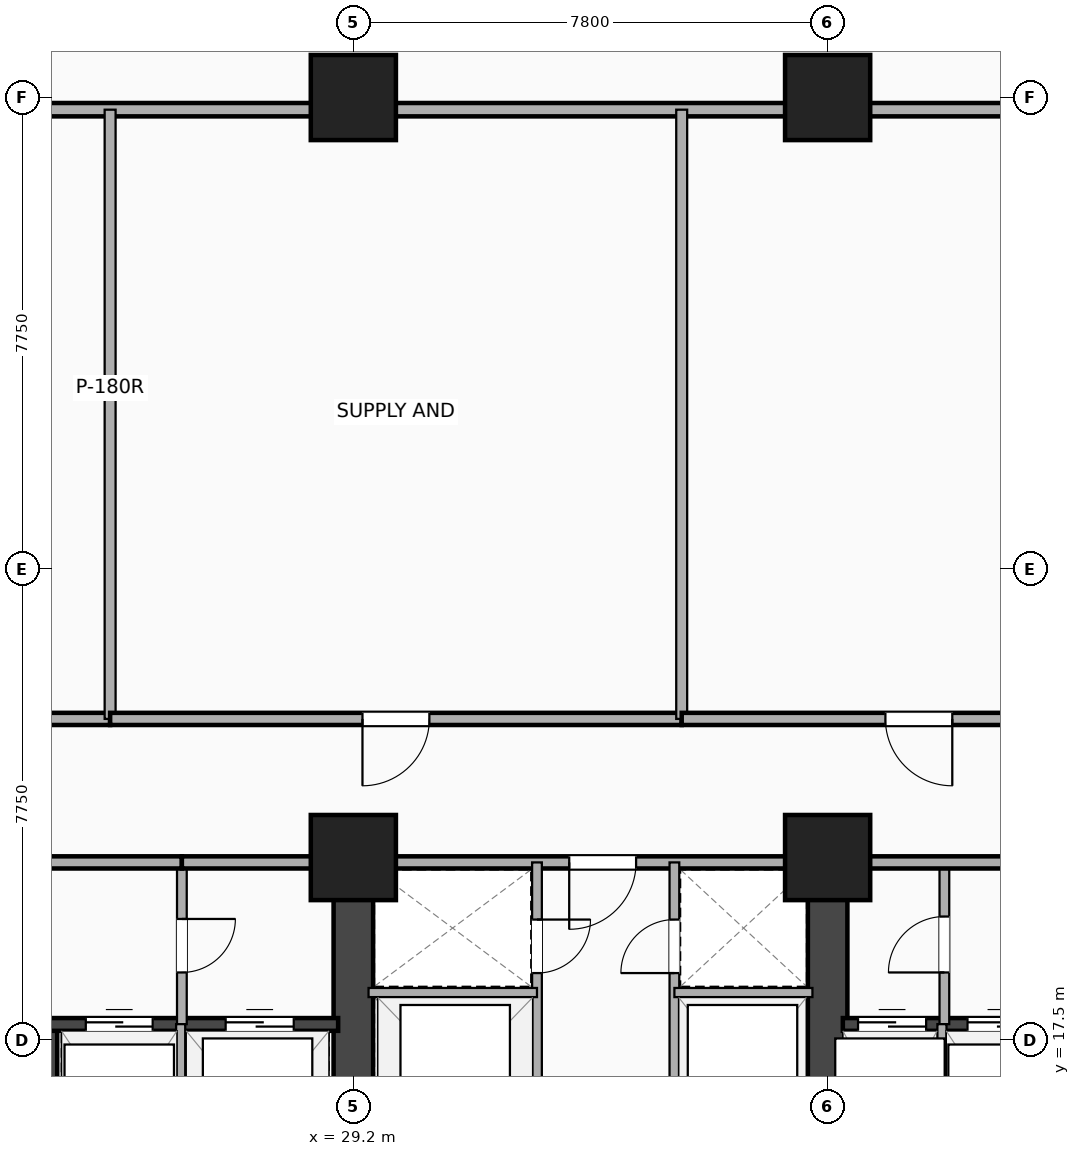
"""IFC4 building model, lengths in metres.
Left out: names, types, materials, properties, quantities, classifications, styles, units other than length and angle.
Written with IfcOpenShell. Run it as: python <this file> out.ifc"""

import sys

from ifc_helpers import new_model, si_unit, direction, frame, frame_2d, origin, origin_2d, place, context, subcontext, project, spatial, rectangle, extrude, element, fill, save


model = new_model("IFC4")
c1 = context("Model", 3, precision=1e-05, world=origin(), true_north=direction((0.0, 1.0)))
c2 = subcontext(c1, "Body", "Model", "MODEL_VIEW")
j1 = project(units=[si_unit("LENGTHUNIT", "METRE"), si_unit("PLANEANGLEUNIT", "RADIAN")], contexts=[c1])
p1 = place(None, origin())
s1 = spatial("IfcSite", under=j1, at=p1, CompositionType="ELEMENT")
p2 = place(p1, origin())
s2 = spatial("IfcBuilding", under=s1, at=p2, CompositionType="ELEMENT")
p3 = place(p2, frame((0.0, 0.0, 75.4)))
s3 = spatial("IfcBuildingStorey", under=s2, at=p3, CompositionType="ELEMENT", Elevation=75.4)
p4 = place(p3, frame((29.2, 3.5, 0.0), z_axis=(0.0, 0.0, 1.0), x_axis=(0.0, 1.0, 0.0)))
e1 = element("IfcWall", 1, at=p4, inside=s3, PredefinedType="SHEAR", context=c2, shape_type="SweptSolid", body=[
    extrude(rectangle(XDim=16.9, YDim=0.65, at=frame_2d((8.45, 0.0))), origin(), (0.0, 0.0, 1.0), 8.14),
])
p5 = place(p4, frame((7.75, 0.0, 0.0), z_axis=(0.0, 0.0, 1.0), x_axis=(-1.0, 0.0, 0.0)))
e2 = element("IfcOpeningElement", 2, at=p5, cuts=e1, PredefinedType="OPENING", context=c2, shape_type="SweptSolid", body=[
    extrude(rectangle(XDim=1.1, YDim=2.15, at=frame_2d((0.55, 1.075))), frame((0.0, 0.335, 0.0), z_axis=(0.0, -1.0, 0.0), x_axis=(1.0, 0.0, 0.0)), (0.0, 0.0, 1.0), 0.67),
])
p6 = place(p3, frame((37.0, 3.5, 0.0), z_axis=(0.0, 0.0, 1.0), x_axis=(0.0, 1.0, 0.0)))
e3 = element("IfcWall", 3, at=p6, inside=s3, PredefinedType="SHEAR", context=c2, shape_type="SweptSolid", body=[
    extrude(rectangle(XDim=16.9, YDim=0.65, at=frame_2d((8.45, 0.0))), origin(), (0.0, 0.0, 1.0), 8.14),
])
p7 = place(p6, frame((6.65, 0.0, 0.0)))
e4 = element("IfcOpeningElement", 4, at=p7, cuts=e3, PredefinedType="OPENING", context=c2, shape_type="SweptSolid", body=[
    extrude(rectangle(XDim=1.1, YDim=2.15, at=frame_2d((0.55, 1.075))), frame((0.0, 0.335, 0.0), z_axis=(0.0, -1.0, 0.0), x_axis=(1.0, 0.0, 0.0)), (0.0, 0.0, 1.0), 0.67),
])
p8 = place(p3, frame((24.225, 9.745, 0.0), z_axis=(0.0, 0.0, 1.0), x_axis=(0.0, 1.0, 0.0)))
e5 = element("IfcWall", 5, at=p8, inside=s3, PredefinedType="SHEAR", context=c2, shape_type="SweptSolid", body=[
    extrude(rectangle(XDim=8.01, YDim=0.21, at=frame_2d((4.005, 0.0))), origin(), (0.0, 0.0, 1.0), 8.14),
])
p9 = place(p3, frame((20.65, 17.755, 0.0), z_axis=(0.0, 0.0, 1.0), x_axis=(1.0, 0.0, 0.0)))
e6 = element("IfcWall", 6, at=p9, inside=s3, PredefinedType="SHEAR", context=c2, shape_type="SweptSolid", body=[
    extrude(rectangle(XDim=8.3, YDim=0.21, at=frame_2d((4.15, 0.0))), origin(), (0.0, 0.0, 1.0), 8.14),
])
p10 = place(p9, frame((2.2, 0.0, 0.0), z_axis=(0.0, 0.0, 1.0), x_axis=(-1.0, 0.0, 0.0)))
e7 = element("IfcOpeningElement", 7, at=p10, cuts=e6, PredefinedType="OPENING", context=c2, shape_type="SweptSolid", body=[
    extrude(rectangle(XDim=1.05, YDim=2.15, at=frame_2d((0.525, 1.075))), frame((0.0, 0.115, 0.0), z_axis=(0.0, -1.0, 0.0), x_axis=(1.0, 0.0, 0.0)), (0.0, 0.0, 1.0), 0.23),
])
p11 = place(p9, frame((4.15, 0.0, 0.0)))
e8 = element("IfcOpeningElement", 8, at=p11, cuts=e6, PredefinedType="OPENING", context=c2, shape_type="SweptSolid", body=[
    extrude(rectangle(XDim=1.1, YDim=2.18, at=frame_2d((0.55, 1.09))), frame((0.0, 0.115, 0.0), z_axis=(0.0, -1.0, 0.0), x_axis=(1.0, 0.0, 0.0)), (0.0, 0.0, 1.0), 0.23),
])
p12 = place(p9, frame((6.45, 0.0, 0.0)))
e9 = element("IfcOpeningElement", 9, at=p12, cuts=e6, PredefinedType="OPENING", context=c2, shape_type="SweptSolid", body=[
    extrude(rectangle(XDim=1.12, YDim=2.2, at=frame_2d((0.56, 1.1))), frame((0.0, 0.115, 0.0), z_axis=(0.0, -1.0, 0.0), x_axis=(1.0, 0.0, 0.0)), (0.0, 0.0, 1.0), 0.23),
])
p13 = place(p3, frame((37.25, 17.755, 0.0), z_axis=(0.0, 0.0, 1.0), x_axis=(1.0, 0.0, 0.0)))
e10 = element("IfcWall", 10, at=p13, inside=s3, PredefinedType="SHEAR", context=c2, shape_type="SweptSolid", body=[
    extrude(rectangle(XDim=7.2, YDim=0.21, at=frame_2d((3.6, 0.0))), origin(), (0.0, 0.0, 1.0), 8.14),
])
p14 = place(p13, frame((0.25, 0.0, 0.0)))
e11 = element("IfcOpeningElement", 11, at=p14, cuts=e10, PredefinedType="OPENING", context=c2, shape_type="SweptSolid", body=[
    extrude(rectangle(XDim=1.12, YDim=2.2, at=frame_2d((0.56, 1.1))), frame((0.0, 0.115, 0.0), z_axis=(0.0, -1.0, 0.0), x_axis=(1.0, 0.0, 0.0)), (0.0, 0.0, 1.0), 0.23),
])
p15 = place(p13, frame((2.05, 0.0, 0.0)))
e12 = element("IfcOpeningElement", 12, at=p15, cuts=e10, PredefinedType="OPENING", context=c2, shape_type="SweptSolid", body=[
    extrude(rectangle(XDim=1.1, YDim=2.18, at=frame_2d((0.55, 1.09))), frame((0.0, 0.115, 0.0), z_axis=(0.0, -1.0, 0.0), x_axis=(1.0, 0.0, 0.0)), (0.0, 0.0, 1.0), 0.23),
])
p16 = place(p13, frame((5.78, 0.0, 0.0), z_axis=(0.0, 0.0, 1.0), x_axis=(-1.0, 0.0, 0.0)))
e13 = element("IfcOpeningElement", 13, at=p16, cuts=e10, PredefinedType="OPENING", context=c2, shape_type="SweptSolid", body=[
    extrude(rectangle(XDim=1.05, YDim=2.15, at=frame_2d((0.525, 1.075))), frame((0.0, 0.115, 0.0), z_axis=(0.0, -1.0, 0.0), x_axis=(1.0, 0.0, 0.0)), (0.0, 0.0, 1.0), 0.23),
])
for number, where, z_axis, x_axis in (
    (14, (29.2, 20.5, -0.32), (0.0, 0.0, 1.0), (1.0, 0.0, 0.0)),
    (15, (37.0, 20.5, -0.32), (0.0, 0.0, 1.0), (1.0, 0.0, 0.0)),
    (16, (29.2, 33.0, -0.32), (0.0, 0.0, 1.0), (1.0, 0.0, 0.0)),
    (17, (37.0, 33.0, -0.32), (0.0, 0.0, 1.0), (1.0, 0.0, 0.0)),
):
    element("IfcColumn", number, at=place(p3, frame(where, z_axis=z_axis, x_axis=x_axis)), inside=s3, PredefinedType="COLUMN", context=c2, shape_type="SweptSolid", body=[
        extrude(rectangle(XDim=1.4, YDim=1.4, at=origin_2d()), origin(), (0.0, 0.0, 1.0), 8.46),
    ])
p17 = place(p3, frame((26.38, 17.76, 0.0), z_axis=(0.0, 0.0, 1.0), x_axis=(0.0, 1.0, 0.0)))
e18 = element("IfcWall", 18, at=p17, inside=s3, PredefinedType="PARTITIONING", context=c2, shape_type="SweptSolid", body=[
    extrude(rectangle(XDim=2.66, YDim=0.16, at=frame_2d((1.33, 0.0))), origin(), (0.0, 0.0, 1.0), 7.43),
])
p18 = place(p17, frame((0.85, 0.0, 0.0)))
e19 = element("IfcOpeningElement", 19, at=p18, cuts=e18, PredefinedType="OPENING", context=c2, shape_type="SweptSolid", body=[
    extrude(rectangle(XDim=0.88, YDim=2.08, at=frame_2d((0.44, 1.04))), frame((0.0, 0.09, 0.0), z_axis=(0.0, -1.0, 0.0), x_axis=(1.0, 0.0, 0.0)), (0.0, 0.0, 1.0), 0.18),
])
p19 = place(p3, frame((38.92, 17.76, 0.0), z_axis=(0.0, 0.0, 1.0), x_axis=(0.0, 1.0, 0.0)))
e20 = element("IfcWall", 20, at=p19, inside=s3, PredefinedType="PARTITIONING", context=c2, shape_type="SweptSolid", body=[
    extrude(rectangle(XDim=2.66, YDim=0.16, at=frame_2d((1.33, 0.0))), origin(), (0.0, 0.0, 1.0), 7.43),
])
p20 = place(p19, frame((1.77, 0.0, 0.0), z_axis=(0.0, 0.0, 1.0), x_axis=(-1.0, 0.0, 0.0)))
e21 = element("IfcOpeningElement", 21, at=p20, cuts=e20, PredefinedType="OPENING", context=c2, shape_type="SweptSolid", body=[
    extrude(rectangle(XDim=0.92, YDim=2.08, at=frame_2d((0.46, 1.04))), frame((0.0, 0.09, 0.0), z_axis=(0.0, -1.0, 0.0), x_axis=(1.0, 0.0, 0.0)), (0.0, 0.0, 1.0), 0.18),
])
for number, where, z_axis, x_axis in (
    (22, (26.36, 14.72, 0.0), (0.0, 0.0, 1.0), (0.0, 1.0, 0.0)),
    (23, (38.88, 14.72, 0.0), (0.0, 0.0, 1.0), (0.0, 1.0, 0.0)),
):
    element("IfcWall", number, at=place(p3, frame(where, z_axis=z_axis, x_axis=x_axis)), inside=s3, PredefinedType="PARTITIONING", context=c2, shape_type="SweptSolid", body=[
        extrude(rectangle(XDim=3.04, YDim=0.15, at=frame_2d((1.52, 0.0))), origin(), (0.0, 0.0, 1.0), 8.14),
    ])
p21 = place(p3, frame((20.65, 20.42, 0.0), z_axis=(0.0, 0.0, 1.0), x_axis=(1.0, 0.0, 0.0)))
e24 = element("IfcWall", 24, at=p21, inside=s3, PredefinedType="PARTITIONING", context=c2, shape_type="SweptSolid", body=[
    extrude(rectangle(XDim=5.73, YDim=0.2, at=frame_2d((2.865, 0.0))), origin(), (0.0, 0.0, 1.0), 7.43),
])
p22 = place(p21, frame((2.3, 0.0, 0.0)))
e25 = element("IfcOpeningElement", 25, at=p22, cuts=e24, PredefinedType="OPENING", context=c2, shape_type="SweptSolid", body=[
    extrude(rectangle(XDim=1.1, YDim=2.15, at=frame_2d((0.55, 1.075))), frame((0.0, 0.11, 0.0), z_axis=(0.0, -1.0, 0.0), x_axis=(1.0, 0.0, 0.0)), (0.0, 0.0, 1.0), 0.22),
])
p23 = place(p3, frame((26.38, 20.42, 0.0), z_axis=(0.0, 0.0, 1.0), x_axis=(1.0, 0.0, 0.0)))
e26 = element("IfcWall", 26, at=p23, inside=s3, PredefinedType="PARTITIONING", context=c2, shape_type="SweptSolid", body=[
    extrude(rectangle(XDim=2.82, YDim=0.2, at=frame_2d((1.41, 0.0))), origin(), (0.0, 0.0, 1.0), 7.43),
])
p24 = place(p3, frame((29.2, 20.42, 0.0), z_axis=(0.0, 0.0, 1.0), x_axis=(1.0, 0.0, 0.0)))
e27 = element("IfcWall", 27, at=p24, inside=s3, PredefinedType="PARTITIONING", context=c2, shape_type="SweptSolid", body=[
    extrude(rectangle(XDim=7.8, YDim=0.2, at=frame_2d((3.9, 0.0))), origin(), (0.0, 0.0, 1.0), 7.43),
])
p25 = place(p24, frame((3.55, 0.0, 0.0)))
e28 = element("IfcOpeningElement", 28, at=p25, cuts=e27, PredefinedType="OPENING", context=c2, shape_type="SweptSolid", body=[
    extrude(rectangle(XDim=1.1, YDim=2.15, at=frame_2d((0.55, 1.075))), frame((0.0, 0.11, 0.0), z_axis=(0.0, -1.0, 0.0), x_axis=(1.0, 0.0, 0.0)), (0.0, 0.0, 1.0), 0.22),
])
p26 = place(p3, frame((37.0, 20.42, 0.0), z_axis=(0.0, 0.0, 1.0), x_axis=(1.0, 0.0, 0.0)))
e29 = element("IfcWall", 29, at=p26, inside=s3, PredefinedType="PARTITIONING", context=c2, shape_type="SweptSolid", body=[
    extrude(rectangle(XDim=7.45, YDim=0.2, at=frame_2d((3.725, 0.0))), origin(), (0.0, 0.0, 1.0), 6.445),
])
p27 = place(p26, frame((4.2, 0.0, 0.0)))
e30 = element("IfcOpeningElement", 30, at=p27, cuts=e29, PredefinedType="OPENING", context=c2, shape_type="SweptSolid", body=[
    extrude(rectangle(XDim=1.1, YDim=2.15, at=frame_2d((0.55, 1.075))), frame((0.0, 0.11, 0.0), z_axis=(0.0, -1.0, 0.0), x_axis=(1.0, 0.0, 0.0)), (0.0, 0.0, 1.0), 0.22),
])
p28 = place(p3, frame((32.22, 12.5, 0.0), z_axis=(0.0, 0.0, 1.0), x_axis=(0.0, 1.0, 0.0)))
e31 = element("IfcWall", 31, at=p28, inside=s3, PredefinedType="PARTITIONING", context=c2, shape_type="SweptSolid", body=[
    extrude(rectangle(XDim=7.92, YDim=0.16, at=frame_2d((3.96, 0.0))), origin(), (0.0, 0.0, 1.0), 7.43),
])
p29 = place(p28, frame((6.1, 0.0, 0.0)))
e32 = element("IfcOpeningElement", 32, at=p29, cuts=e31, PredefinedType="OPENING", context=c2, shape_type="SweptSolid", body=[
    extrude(rectangle(XDim=0.88, YDim=2.08, at=frame_2d((0.44, 1.04))), frame((0.0, 0.09, 0.0), z_axis=(0.0, -1.0, 0.0), x_axis=(1.0, 0.0, 0.0)), (0.0, 0.0, 1.0), 0.18),
])
p30 = place(p3, frame((34.48, 12.5, 0.0), z_axis=(0.0, 0.0, 1.0), x_axis=(0.0, 1.0, 0.0)))
e33 = element("IfcWall", 33, at=p30, inside=s3, PredefinedType="PARTITIONING", context=c2, shape_type="SweptSolid", body=[
    extrude(rectangle(XDim=7.92, YDim=0.16, at=frame_2d((3.96, 0.0))), origin(), (0.0, 0.0, 1.0), 7.43),
])
p31 = place(p30, frame((6.98, 0.0, 0.0), z_axis=(0.0, 0.0, 1.0), x_axis=(-1.0, 0.0, 0.0)))
e34 = element("IfcOpeningElement", 34, at=p31, cuts=e33, PredefinedType="OPENING", context=c2, shape_type="SweptSolid", body=[
    extrude(rectangle(XDim=0.88, YDim=2.08, at=frame_2d((0.44, 1.04))), frame((0.0, 0.09, 0.0), z_axis=(0.0, -1.0, 0.0), x_axis=(1.0, 0.0, 0.0)), (0.0, 0.0, 1.0), 0.18),
])
p32 = place(p3, frame((29.45, 18.28, 0.0), z_axis=(0.0, 0.0, 1.0), x_axis=(1.0, 0.0, 0.0)))
e35 = element("IfcWall", 35, at=p32, inside=s3, PredefinedType="PARTITIONING", context=c2, shape_type="SweptSolid", body=[
    extrude(rectangle(XDim=2.77, YDim=0.15, at=frame_2d((1.385, 0.0))), origin(), (0.0, 0.0, 1.0), 8.14),
])
p33 = place(p3, frame((34.48, 18.28, 0.0), z_axis=(0.0, 0.0, 1.0), x_axis=(1.0, 0.0, 0.0)))
e36 = element("IfcWall", 36, at=p33, inside=s3, PredefinedType="PARTITIONING", context=c2, shape_type="SweptSolid", body=[
    extrude(rectangle(XDim=2.27, YDim=0.15, at=frame_2d((1.135, 0.0))), origin(), (0.0, 0.0, 1.0), 8.14),
])
p34 = place(p3, frame((15.45, 32.8, 0.0), z_axis=(0.0, 0.0, 1.0), x_axis=(1.0, 0.0, 0.0)))
e37 = element("IfcWall", 37, at=p34, inside=s3, PredefinedType="PARTITIONING", context=c2, shape_type="SweptSolid", body=[
    extrude(rectangle(XDim=42.25, YDim=0.22, at=frame_2d((21.125, 0.0))), origin(), (0.0, 0.0, 1.0), 6.445),
])
p35 = place(p3, frame((15.45, 22.78, 0.0), z_axis=(0.0, 0.0, 1.0), x_axis=(1.0, 0.0, 0.0)))
e38 = element("IfcWall", 38, at=p35, inside=s3, PredefinedType="PARTITIONING", context=c2, shape_type="SweptSolid", body=[
    extrude(rectangle(XDim=9.75, YDim=0.2, at=frame_2d((4.875, 0.0))), origin(), (0.0, 0.0, 1.0), 7.43),
])
p36 = place(p35, frame((4.325, 0.0, 0.0)))
e39 = element("IfcOpeningElement", 39, at=p36, cuts=e38, PredefinedType="OPENING", context=c2, shape_type="SweptSolid", body=[
    extrude(rectangle(XDim=1.1, YDim=2.15, at=frame_2d((0.55, 1.075))), frame((0.0, 0.11, 0.0), z_axis=(0.0, -1.0, 0.0), x_axis=(1.0, 0.0, 0.0)), (0.0, 0.0, 1.0), 0.22),
])
p37 = place(p3, frame((25.2, 22.78, 0.0), z_axis=(0.0, 0.0, 1.0), x_axis=(0.0, 1.0, 0.0)))
e40 = element("IfcWall", 40, at=p37, inside=s3, PredefinedType="PARTITIONING", context=c2, shape_type="SweptSolid", body=[
    extrude(rectangle(XDim=10.02, YDim=0.18, at=frame_2d((5.01, 0.0))), origin(), (0.0, 0.0, 1.0), 7.43),
])
p38 = place(p3, frame((25.2, 22.78, 0.0), z_axis=(0.0, 0.0, 1.0), x_axis=(1.0, 0.0, 0.0)))
e41 = element("IfcWall", 41, at=p38, inside=s3, PredefinedType="PARTITIONING", context=c2, shape_type="SweptSolid", body=[
    extrude(rectangle(XDim=9.4, YDim=0.2, at=frame_2d((4.7, 0.0))), origin(), (0.0, 0.0, 1.0), 7.43),
])
p39 = place(p38, frame((4.15, 0.0, 0.0)))
e42 = element("IfcOpeningElement", 42, at=p39, cuts=e41, PredefinedType="OPENING", context=c2, shape_type="SweptSolid", body=[
    extrude(rectangle(XDim=1.1, YDim=2.15, at=frame_2d((0.55, 1.075))), frame((0.0, 0.11, 0.0), z_axis=(0.0, -1.0, 0.0), x_axis=(1.0, 0.0, 0.0)), (0.0, 0.0, 1.0), 0.22),
])
p40 = place(p3, frame((34.6, 22.78, 0.0), z_axis=(0.0, 0.0, 1.0), x_axis=(0.0, 1.0, 0.0)))
e43 = element("IfcWall", 43, at=p40, inside=s3, PredefinedType="PARTITIONING", context=c2, shape_type="SweptSolid", body=[
    extrude(rectangle(XDim=10.02, YDim=0.18, at=frame_2d((5.01, 0.0))), origin(), (0.0, 0.0, 1.0), 7.43),
])
p41 = place(p3, frame((34.6, 22.78, 0.0), z_axis=(0.0, 0.0, 1.0), x_axis=(1.0, 0.0, 0.0)))
e44 = element("IfcWall", 44, at=p41, inside=s3, PredefinedType="PARTITIONING", context=c2, shape_type="SweptSolid", body=[
    extrude(rectangle(XDim=7.8, YDim=0.2, at=frame_2d((3.9, 0.0))), origin(), (0.0, 0.0, 1.0), 7.43),
])
p42 = place(p41, frame((3.35, 0.0, 0.0)))
e45 = element("IfcOpeningElement", 45, at=p42, cuts=e44, PredefinedType="OPENING", context=c2, shape_type="SweptSolid", body=[
    extrude(rectangle(XDim=1.1, YDim=2.15, at=frame_2d((0.55, 1.075))), frame((0.0, 0.11, 0.0), z_axis=(0.0, -1.0, 0.0), x_axis=(1.0, 0.0, 0.0)), (0.0, 0.0, 1.0), 0.22),
])
p43 = place(p11, origin())
e46 = element("IfcDoor", 46, at=p43, inside=s3, OperationType="DOUBLE_DOOR_SLIDING", PredefinedType="DOOR", context=c2, shape_type="SweptSolid", body=[
    extrude(rectangle(XDim=1.1, YDim=2.18, at=frame_2d((0.55, 1.09))), frame((0.0, 0.025, 0.0), z_axis=(0.0, -1.0, 0.0), x_axis=(1.0, 0.0, 0.0)), (0.0, 0.0, 1.0), 0.05),
])
fill(e8, e46)
p44 = place(p12, origin())
e47 = element("IfcDoor", 47, at=p44, inside=s3, OperationType="DOUBLE_DOOR_SLIDING", PredefinedType="DOOR", context=c2, shape_type="SweptSolid", body=[
    extrude(rectangle(XDim=1.12, YDim=2.2, at=frame_2d((0.56, 1.1))), frame((0.0, 0.025, 0.0), z_axis=(0.0, -1.0, 0.0), x_axis=(1.0, 0.0, 0.0)), (0.0, 0.0, 1.0), 0.05),
])
fill(e9, e47)
p45 = place(p14, origin())
e48 = element("IfcDoor", 48, at=p45, inside=s3, OperationType="DOUBLE_DOOR_SLIDING", PredefinedType="DOOR", context=c2, shape_type="SweptSolid", body=[
    extrude(rectangle(XDim=1.12, YDim=2.2, at=frame_2d((0.56, 1.1))), frame((0.0, 0.025, 0.0), z_axis=(0.0, -1.0, 0.0), x_axis=(1.0, 0.0, 0.0)), (0.0, 0.0, 1.0), 0.05),
])
fill(e11, e48)
p46 = place(p15, origin())
e49 = element("IfcDoor", 49, at=p46, inside=s3, OperationType="DOUBLE_DOOR_SLIDING", PredefinedType="DOOR", context=c2, shape_type="SweptSolid", body=[
    extrude(rectangle(XDim=1.1, YDim=2.18, at=frame_2d((0.55, 1.09))), frame((0.0, 0.025, 0.0), z_axis=(0.0, -1.0, 0.0), x_axis=(1.0, 0.0, 0.0)), (0.0, 0.0, 1.0), 0.05),
])
fill(e12, e49)
p47 = place(p18, origin())
e50 = element("IfcDoor", 50, at=p47, inside=s3, OperationType="SINGLE_SWING_RIGHT", PredefinedType="DOOR", context=c2, shape_type="SweptSolid", body=[
    extrude(rectangle(XDim=0.88, YDim=2.08, at=frame_2d((0.44, 1.04))), frame((0.0, 0.025, 0.0), z_axis=(0.0, -1.0, 0.0), x_axis=(1.0, 0.0, 0.0)), (0.0, 0.0, 1.0), 0.05),
])
fill(e19, e50)
p48 = place(p20, origin())
e51 = element("IfcDoor", 51, at=p48, inside=s3, OperationType="SINGLE_SWING_LEFT", PredefinedType="DOOR", context=c2, shape_type="SweptSolid", body=[
    extrude(rectangle(XDim=0.92, YDim=2.08, at=frame_2d((0.46, 1.04))), frame((0.0, 0.025, 0.0), z_axis=(0.0, -1.0, 0.0), x_axis=(1.0, 0.0, 0.0)), (0.0, 0.0, 1.0), 0.05),
])
fill(e21, e51)
p49 = place(p25, origin())
e52 = element("IfcDoor", 52, at=p49, inside=s3, OperationType="SINGLE_SWING_LEFT", PredefinedType="DOOR", context=c2, shape_type="SweptSolid", body=[
    extrude(rectangle(XDim=1.1, YDim=2.15, at=frame_2d((0.55, 1.075))), frame((0.0, 0.025, 0.0), z_axis=(0.0, -1.0, 0.0), x_axis=(1.0, 0.0, 0.0)), (0.0, 0.0, 1.0), 0.05),
])
fill(e28, e52)
p50 = place(p29, origin())
e53 = element("IfcDoor", 53, at=p50, inside=s3, OperationType="SINGLE_SWING_RIGHT", PredefinedType="DOOR", context=c2, shape_type="SweptSolid", body=[
    extrude(rectangle(XDim=0.88, YDim=2.08, at=frame_2d((0.44, 1.04))), frame((0.0, 0.025, 0.0), z_axis=(0.0, -1.0, 0.0), x_axis=(1.0, 0.0, 0.0)), (0.0, 0.0, 1.0), 0.05),
])
fill(e32, e53)
p51 = place(p31, origin())
e54 = element("IfcDoor", 54, at=p51, inside=s3, OperationType="SINGLE_SWING_LEFT", PredefinedType="DOOR", context=c2, shape_type="SweptSolid", body=[
    extrude(rectangle(XDim=0.88, YDim=2.08, at=frame_2d((0.44, 1.04))), frame((0.0, 0.025, 0.0), z_axis=(0.0, -1.0, 0.0), x_axis=(1.0, 0.0, 0.0)), (0.0, 0.0, 1.0), 0.05),
])
fill(e34, e54)
p52 = place(p39, origin())
e55 = element("IfcDoor", 55, at=p52, inside=s3, OperationType="SINGLE_SWING_LEFT", PredefinedType="DOOR", context=c2, shape_type="SweptSolid", body=[
    extrude(rectangle(XDim=1.1, YDim=2.15, at=frame_2d((0.55, 1.075))), frame((0.0, 0.025, 0.0), z_axis=(0.0, -1.0, 0.0), x_axis=(1.0, 0.0, 0.0)), (0.0, 0.0, 1.0), 0.05),
])
fill(e42, e55)
p53 = place(p42, origin())
e56 = element("IfcDoor", 56, at=p53, inside=s3, OperationType="SINGLE_SWING_RIGHT", PredefinedType="DOOR", context=c2, shape_type="SweptSolid", body=[
    extrude(rectangle(XDim=1.1, YDim=2.15, at=frame_2d((0.55, 1.075))), frame((0.0, 0.025, 0.0), z_axis=(0.0, -1.0, 0.0), x_axis=(1.0, 0.0, 0.0)), (0.0, 0.0, 1.0), 0.05),
])
fill(e45, e56)
save(model, sys.argv[1])
